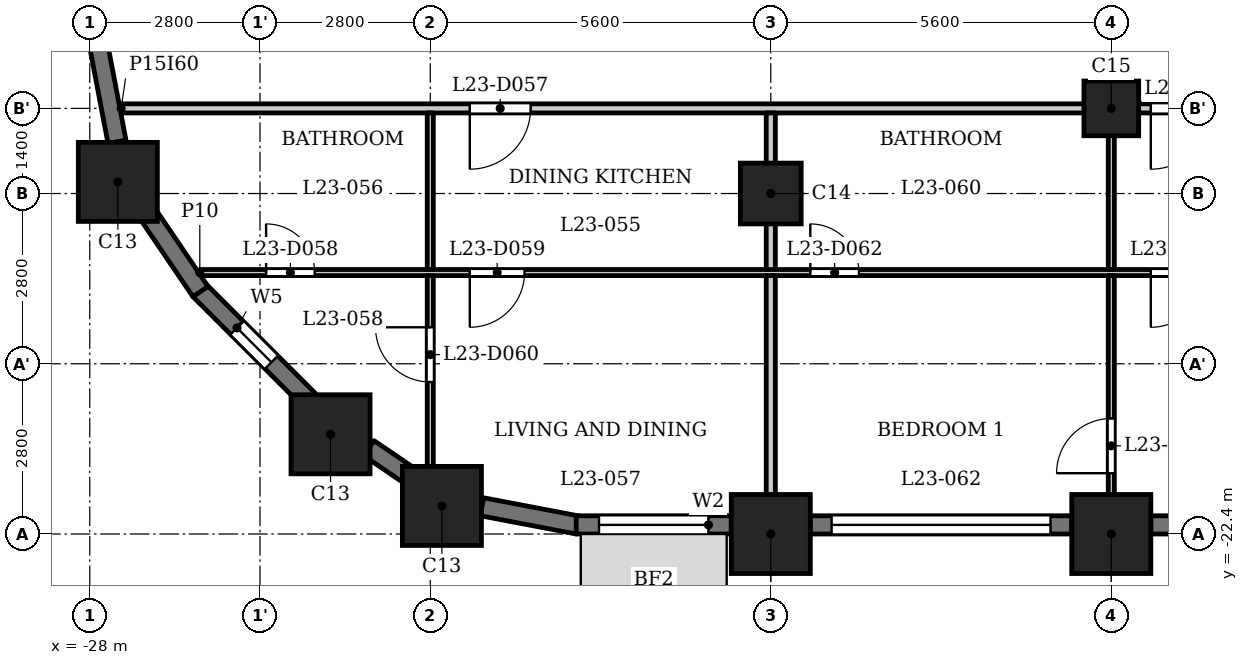
"""IFC4 building model, lengths in metres.
Left out: names, types, materials, properties, quantities, classifications, styles, units other than length and angle.
Written with IfcOpenShell. Run it as: python <this file> out.ifc"""

import sys

from ifc_helpers import new_model, si_unit, direction, frame, frame_2d, origin, origin_2d, place, context, subcontext, project, spatial, rectangle, extrude, element, fill, save


model = new_model("IFC4")
c1 = context("Model", 3, precision=1e-05, world=origin(), true_north=direction((0.0, 1.0)))
c2 = subcontext(c1, "Body", "Model", "MODEL_VIEW")
j1 = project(units=[si_unit("LENGTHUNIT", "METRE"), si_unit("PLANEANGLEUNIT", "RADIAN")], contexts=[c1])
p1 = place(None, origin())
s1 = spatial("IfcSite", under=j1, at=p1, CompositionType="ELEMENT")
p2 = place(p1, origin())
s2 = spatial("IfcBuilding", under=s1, at=p2, CompositionType="ELEMENT")
p3 = place(p2, frame((0.0, 0.0, 93.8)))
s3 = spatial("IfcBuildingStorey", under=s2, at=p3, CompositionType="ELEMENT", Elevation=93.8)
for number, where, z_axis, x_axis in (
    (1, (-22.209, -21.938, 0.0), (0.0, 0.0, 1.0), (1.0, 0.0, 0.0)),
    (2, (-16.8, -22.4, 0.0), (0.0, 0.0, 1.0), (1.0, 0.0, 0.0)),
    (3, (-11.2, -22.4, 0.0), (0.0, 0.0, 1.0), (1.0, 0.0, 0.0)),
    (4, (-27.538, -16.609, 0.0), (0.0, 0.0, 1.0), (1.0, 0.0, 0.0)),
    (5, (-24.04, -20.76, 0.0), (0.0, 0.0, 1.0), (1.0, 0.0, 0.0)),
):
    element("IfcColumn", number, at=place(p3, frame(where, z_axis=z_axis, x_axis=x_axis)), inside=s3, PredefinedType="COLUMN", context=c2, shape_type="SweptSolid", body=[
        extrude(rectangle(XDim=1.3, YDim=1.3, at=origin_2d()), origin(), (0.0, 0.0, 1.0), 3.5),
    ])
p4 = place(p3, frame((-16.8, -16.8, 0.0), z_axis=(0.0, 0.0, 1.0), x_axis=(1.0, 0.0, 0.0)))
e6 = element("IfcColumn", 6, at=p4, inside=s3, PredefinedType="COLUMN", context=c2, shape_type="SweptSolid", body=[
    extrude(rectangle(XDim=1.0, YDim=1.0, at=origin_2d()), origin(), (0.0, 0.0, 1.0), 3.5),
])
p5 = place(p3, frame((-11.2, -15.4, 0.0), z_axis=(0.0, 0.0, 1.0), x_axis=(1.0, 0.0, 0.0)))
e7 = element("IfcColumn", 7, at=p5, inside=s3, PredefinedType="COLUMN", context=c2, shape_type="SweptSolid", body=[
    extrude(rectangle(XDim=0.9, YDim=0.9, at=origin_2d()), origin(), (0.0, 0.0, 1.0), 3.5),
])
p6 = place(p3, frame((-26.197, -18.391, 0.0), z_axis=(0.0, 0.0, 1.0), x_axis=(0.707058908279, -0.707154650853, 0.0)))
e8 = element("IfcWall", 8, at=p6, inside=s3, PredefinedType="SOLIDWALL", context=c2, shape_type="SweptSolid", body=[
    extrude(rectangle(XDim=2.55, YDim=0.3, at=frame_2d((1.275, 0.0))), origin(), (0.0, 0.0, 1.0), 2.4),
])
p7 = place(p6, frame((0.875, 0.0, 0.6)))
e9 = element("IfcOpeningElement", 9, at=p7, cuts=e8, PredefinedType="OPENING", context=c2, shape_type="SweptSolid", body=[
    extrude(rectangle(XDim=0.8, YDim=1.55, at=frame_2d((0.4, 0.775))), frame((0.0, 0.16, 0.0), z_axis=(0.0, -1.0, 0.0), x_axis=(1.0, 0.0, 0.0)), (0.0, 0.0, 1.0), 0.32),
])
p8 = place(p3, frame((-23.41, -20.989, 0.0), z_axis=(0.0, 0.0, 1.0), x_axis=(0.827050703543, -0.562127328787, 0.0)))
e10 = element("IfcWall", 10, at=p8, inside=s3, PredefinedType="SOLIDWALL", context=c2, shape_type="SweptSolid", body=[
    extrude(rectangle(XDim=0.877, YDim=0.3, at=frame_2d((0.438, 0.0))), origin(), (0.0, 0.0, 1.0), 3.2),
])
p9 = place(p3, frame((-21.55, -21.952, 0.0), z_axis=(0.0, 0.0, 1.0), x_axis=(0.982278644094, -0.187426426519, 0.0)))
e11 = element("IfcWall", 11, at=p9, inside=s3, PredefinedType="SOLIDWALL", context=c2, shape_type="SweptSolid", body=[
    extrude(rectangle(XDim=1.606, YDim=0.3, at=frame_2d((0.803, 0.0))), origin(), (0.0, 0.0, 1.0), 2.4),
])
p10 = place(p3, frame((-20.0, -22.25, 0.0), z_axis=(0.0, 0.0, 1.0), x_axis=(1.0, 0.0, 0.0)))
e12 = element("IfcWall", 12, at=p10, inside=s3, PredefinedType="SOLIDWALL", context=c2, shape_type="SweptSolid", body=[
    extrude(rectangle(XDim=2.55, YDim=0.3, at=frame_2d((1.275, 0.0))), origin(), (0.0, 0.0, 1.0), 2.4),
])
p11 = place(p10, frame((0.375, 0.0, 0.9)))
e13 = element("IfcOpeningElement", 13, at=p11, cuts=e12, PredefinedType="OPENING", context=c2, shape_type="SweptSolid", body=[
    extrude(rectangle(XDim=1.8, YDim=1.25, at=frame_2d((0.9, 0.625))), frame((0.0, 0.16, 0.0), z_axis=(0.0, -1.0, 0.0), x_axis=(1.0, 0.0, 0.0)), (0.0, 0.0, 1.0), 0.32),
])
p12 = place(p3, frame((-16.15, -22.25, 0.0), z_axis=(0.0, 0.0, 1.0), x_axis=(1.0, 0.0, 0.0)))
e14 = element("IfcWall", 14, at=p12, inside=s3, PredefinedType="SOLIDWALL", context=c2, shape_type="SweptSolid", body=[
    extrude(rectangle(XDim=4.3, YDim=0.3, at=frame_2d((2.15, 0.0))), origin(), (0.0, 0.0, 1.0), 2.4),
])
p13 = place(p12, frame((0.35, 0.0, 1.2)))
e15 = element("IfcOpeningElement", 15, at=p13, cuts=e14, PredefinedType="OPENING", context=c2, shape_type="SweptSolid", body=[
    extrude(rectangle(XDim=3.6, YDim=0.95, at=frame_2d((1.8, 0.475))), frame((0.0, 0.16, 0.0), z_axis=(0.0, -1.0, 0.0), x_axis=(1.0, 0.0, 0.0)), (0.0, 0.0, 1.0), 0.32),
])
p14 = place(p3, frame((-10.55, -22.25, 0.0), z_axis=(0.0, 0.0, 1.0), x_axis=(1.0, 0.0, 0.0)))
e16 = element("IfcWall", 16, at=p14, inside=s3, PredefinedType="SOLIDWALL", context=c2, shape_type="SweptSolid", body=[
    extrude(rectangle(XDim=4.3, YDim=0.3, at=frame_2d((2.15, 0.0))), origin(), (0.0, 0.0, 1.0), 2.4),
])
p15 = place(p14, frame((0.35, 0.0, 1.2)))
e17 = element("IfcOpeningElement", 17, at=p15, cuts=e16, PredefinedType="OPENING", context=c2, shape_type="SweptSolid", body=[
    extrude(rectangle(XDim=3.6, YDim=0.95, at=frame_2d((1.8, 0.475))), frame((0.0, 0.16, 0.0), z_axis=(0.0, -1.0, 0.0), x_axis=(1.0, 0.0, 0.0)), (0.0, 0.0, 1.0), 0.32),
])
for number, where, z_axis, x_axis in (
    (18, (-27.853, -14.372, 0.0), (0.0, 0.0, 1.0), (0.187, -0.982, 0.0)),
    (19, (-27.082, -17.084, 0.0), (0.0, 0.0, 1.0), (0.562, -0.827, 0.0)),
):
    element("IfcWall", number, at=place(p3, frame(where, z_axis=z_axis, x_axis=x_axis)), inside=s3, PredefinedType="SOLIDWALL", context=c2, shape_type="SweptSolid", body=[
        extrude(rectangle(XDim=1.606, YDim=0.3, at=frame_2d((0.803, 0.0))), origin(), (0.0, 0.0, 1.0), 2.4),
    ])
p16 = place(p3, frame((-26.19, -18.1, 0.0), z_axis=(0.0, 0.0, 1.0), x_axis=(1.0, 0.0, 0.0)))
e20 = element("IfcWall", 20, at=p16, inside=s3, PredefinedType="PARTITIONING", context=c2, shape_type="SweptSolid", body=[
    extrude(rectangle(XDim=52.63, YDim=0.1, at=frame_2d((26.315, 0.0))), origin(), (0.0, 0.0, 1.0), 3.2),
])
p17 = place(p16, frame((1.09, 0.0, 0.0)))
e21 = element("IfcOpeningElement", 21, at=p17, cuts=e20, PredefinedType="OPENING", context=c2, shape_type="SweptSolid", body=[
    extrude(rectangle(XDim=0.8, YDim=2.1, at=frame_2d((0.4, 1.05))), frame((0.0, 0.06, 0.0), z_axis=(0.0, -1.0, 0.0), x_axis=(1.0, 0.0, 0.0)), (0.0, 0.0, 1.0), 0.12),
])
p18 = place(p16, frame((4.44, 0.0, 0.0)))
e22 = element("IfcOpeningElement", 22, at=p18, cuts=e20, PredefinedType="OPENING", context=c2, shape_type="SweptSolid", body=[
    extrude(rectangle(XDim=0.9, YDim=2.1, at=frame_2d((0.45, 1.05))), frame((0.0, 0.06, 0.0), z_axis=(0.0, -1.0, 0.0), x_axis=(1.0, 0.0, 0.0)), (0.0, 0.0, 1.0), 0.12),
])
p19 = place(p16, frame((10.04, 0.0, 0.0)))
e23 = element("IfcOpeningElement", 23, at=p19, cuts=e20, PredefinedType="OPENING", context=c2, shape_type="SweptSolid", body=[
    extrude(rectangle(XDim=0.8, YDim=2.1, at=frame_2d((0.4, 1.05))), frame((0.0, 0.06, 0.0), z_axis=(0.0, -1.0, 0.0), x_axis=(1.0, 0.0, 0.0)), (0.0, 0.0, 1.0), 0.12),
])
p20 = place(p16, frame((15.64, 0.0, 0.0)))
e24 = element("IfcOpeningElement", 24, at=p20, cuts=e20, PredefinedType="OPENING", context=c2, shape_type="SweptSolid", body=[
    extrude(rectangle(XDim=0.9, YDim=2.1, at=frame_2d((0.45, 1.05))), frame((0.0, 0.06, 0.0), z_axis=(0.0, -1.0, 0.0), x_axis=(1.0, 0.0, 0.0)), (0.0, 0.0, 1.0), 0.12),
])
p21 = place(p16, frame((24.74, 0.0, 0.0)))
e25 = element("IfcOpeningElement", 25, at=p21, cuts=e20, PredefinedType="OPENING", context=c2, shape_type="SweptSolid", body=[
    extrude(rectangle(XDim=0.8, YDim=2.1, at=frame_2d((0.4, 1.05))), frame((0.0, 0.06, 0.0), z_axis=(0.0, -1.0, 0.0), x_axis=(1.0, 0.0, 0.0)), (0.0, 0.0, 1.0), 0.12),
])
p22 = place(p16, frame((21.24, 0.0, 0.0)))
e26 = element("IfcOpeningElement", 26, at=p22, cuts=e20, PredefinedType="OPENING", context=c2, shape_type="SweptSolid", body=[
    extrude(rectangle(XDim=0.9, YDim=2.1, at=frame_2d((0.45, 1.05))), frame((0.0, 0.06, 0.0), z_axis=(0.0, -1.0, 0.0), x_axis=(1.0, 0.0, 0.0)), (0.0, 0.0, 1.0), 0.12),
])
p23 = place(p16, frame((35.94, 0.0, 0.0)))
e27 = element("IfcOpeningElement", 27, at=p23, cuts=e20, PredefinedType="OPENING", context=c2, shape_type="SweptSolid", body=[
    extrude(rectangle(XDim=0.8, YDim=2.1, at=frame_2d((0.4, 1.05))), frame((0.0, 0.06, 0.0), z_axis=(0.0, -1.0, 0.0), x_axis=(1.0, 0.0, 0.0)), (0.0, 0.0, 1.0), 0.12),
])
p24 = place(p16, frame((33.19, 0.0, 0.0)))
e28 = element("IfcOpeningElement", 28, at=p24, cuts=e20, PredefinedType="OPENING", context=c2, shape_type="SweptSolid", body=[
    extrude(rectangle(XDim=0.9, YDim=2.1, at=frame_2d((0.45, 1.05))), frame((0.0, 0.06, 0.0), z_axis=(0.0, -1.0, 0.0), x_axis=(1.0, 0.0, 0.0)), (0.0, 0.0, 1.0), 0.12),
])
p25 = place(p16, frame((27.59, 0.0, 0.0)))
e29 = element("IfcOpeningElement", 29, at=p25, cuts=e20, PredefinedType="OPENING", context=c2, shape_type="SweptSolid", body=[
    extrude(rectangle(XDim=0.9, YDim=2.1, at=frame_2d((0.45, 1.05))), frame((0.0, 0.06, 0.0), z_axis=(0.0, -1.0, 0.0), x_axis=(1.0, 0.0, 0.0)), (0.0, 0.0, 1.0), 0.12),
])
p26 = place(p16, frame((29.64, 0.0, 0.0)))
e30 = element("IfcOpeningElement", 30, at=p26, cuts=e20, PredefinedType="OPENING", context=c2, shape_type="SweptSolid", body=[
    extrude(rectangle(XDim=0.9, YDim=2.1, at=frame_2d((0.45, 1.05))), frame((0.0, 0.06, 0.0), z_axis=(0.0, -1.0, 0.0), x_axis=(1.0, 0.0, 0.0)), (0.0, 0.0, 1.0), 0.12),
])
p27 = place(p16, frame((41.54, 0.0, 0.0)))
e31 = element("IfcOpeningElement", 31, at=p27, cuts=e20, PredefinedType="OPENING", context=c2, shape_type="SweptSolid", body=[
    extrude(rectangle(XDim=0.8, YDim=2.1, at=frame_2d((0.4, 1.05))), frame((0.0, 0.06, 0.0), z_axis=(0.0, -1.0, 0.0), x_axis=(1.0, 0.0, 0.0)), (0.0, 0.0, 1.0), 0.12),
])
p28 = place(p16, frame((38.54, 0.0, 0.0)))
e32 = element("IfcOpeningElement", 32, at=p28, cuts=e20, PredefinedType="OPENING", context=c2, shape_type="SweptSolid", body=[
    extrude(rectangle(XDim=0.9, YDim=2.1, at=frame_2d((0.45, 1.05))), frame((0.0, 0.06, 0.0), z_axis=(0.0, -1.0, 0.0), x_axis=(1.0, 0.0, 0.0)), (0.0, 0.0, 1.0), 0.12),
])
p29 = place(p16, frame((49.204, 0.0, 0.0)))
e33 = element("IfcOpeningElement", 33, at=p29, cuts=e20, PredefinedType="OPENING", context=c2, shape_type="SweptSolid", body=[
    extrude(rectangle(XDim=0.8, YDim=2.1, at=frame_2d((0.4, 1.05))), frame((0.0, 0.06, 0.0), z_axis=(0.0, -1.0, 0.0), x_axis=(1.0, 0.0, 0.0)), (0.0, 0.0, 1.0), 0.12),
])
p30 = place(p16, frame((43.64, 0.0, 0.0)))
e34 = element("IfcOpeningElement", 34, at=p30, cuts=e20, PredefinedType="OPENING", context=c2, shape_type="SweptSolid", body=[
    extrude(rectangle(XDim=0.9, YDim=2.1, at=frame_2d((0.45, 1.05))), frame((0.0, 0.06, 0.0), z_axis=(0.0, -1.0, 0.0), x_axis=(1.0, 0.0, 0.0)), (0.0, 0.0, 1.0), 0.12),
])
p31 = place(p3, frame((-27.484, -15.4, 0.0), z_axis=(0.0, 0.0, 1.0), x_axis=(1.0, 0.0, 0.0)))
e35 = element("IfcWall", 35, at=p31, inside=s3, PredefinedType="PARTITIONING", context=c2, shape_type="SweptSolid", body=[
    extrude(rectangle(XDim=54.968, YDim=0.15, at=frame_2d((27.484, 0.0))), origin(), (0.0, 0.0, 1.0), 3.2),
])
p32 = place(p31, frame((5.734, 0.0, 0.0)))
e36 = element("IfcOpeningElement", 36, at=p32, cuts=e35, PredefinedType="OPENING", context=c2, shape_type="SweptSolid", body=[
    extrude(rectangle(XDim=1.0, YDim=2.1, at=frame_2d((0.5, 1.05))), frame((0.0, 0.085, 0.0), z_axis=(0.0, -1.0, 0.0), x_axis=(1.0, 0.0, 0.0)), (0.0, 0.0, 1.0), 0.17),
])
p33 = place(p31, frame((16.934, 0.0, 0.0)))
e37 = element("IfcOpeningElement", 37, at=p33, cuts=e35, PredefinedType="OPENING", context=c2, shape_type="SweptSolid", body=[
    extrude(rectangle(XDim=1.0, YDim=2.1, at=frame_2d((0.5, 1.05))), frame((0.0, 0.085, 0.0), z_axis=(0.0, -1.0, 0.0), x_axis=(1.0, 0.0, 0.0)), (0.0, 0.0, 1.0), 0.17),
])
p34 = place(p31, frame((22.534, 0.0, 0.0)))
e38 = element("IfcOpeningElement", 38, at=p34, cuts=e35, PredefinedType="OPENING", context=c2, shape_type="SweptSolid", body=[
    extrude(rectangle(XDim=1.0, YDim=2.1, at=frame_2d((0.5, 1.05))), frame((0.0, 0.085, 0.0), z_axis=(0.0, -1.0, 0.0), x_axis=(1.0, 0.0, 0.0)), (0.0, 0.0, 1.0), 0.17),
])
p35 = place(p31, frame((31.384, 0.0, 0.0)))
e39 = element("IfcOpeningElement", 39, at=p35, cuts=e35, PredefinedType="OPENING", context=c2, shape_type="SweptSolid", body=[
    extrude(rectangle(XDim=1.0, YDim=2.1, at=frame_2d((0.5, 1.05))), frame((0.0, 0.085, 0.0), z_axis=(0.0, -1.0, 0.0), x_axis=(1.0, 0.0, 0.0)), (0.0, 0.0, 1.0), 0.17),
])
p36 = place(p31, frame((39.584, 0.0, 0.0)))
e40 = element("IfcOpeningElement", 40, at=p36, cuts=e35, PredefinedType="OPENING", context=c2, shape_type="SweptSolid", body=[
    extrude(rectangle(XDim=1.0, YDim=2.1, at=frame_2d((0.5, 1.05))), frame((0.0, 0.085, 0.0), z_axis=(0.0, -1.0, 0.0), x_axis=(1.0, 0.0, 0.0)), (0.0, 0.0, 1.0), 0.17),
])
p37 = place(p31, frame((44.934, 0.0, 0.0)))
e41 = element("IfcOpeningElement", 41, at=p37, cuts=e35, PredefinedType="OPENING", context=c2, shape_type="SweptSolid", body=[
    extrude(rectangle(XDim=1.0, YDim=2.1, at=frame_2d((0.5, 1.05))), frame((0.0, 0.085, 0.0), z_axis=(0.0, -1.0, 0.0), x_axis=(1.0, 0.0, 0.0)), (0.0, 0.0, 1.0), 0.17),
])
p38 = place(p3, frame((-22.4, -21.72, 0.0), z_axis=(0.0, 0.0, 1.0), x_axis=(0.0, 1.0, 0.0)))
e42 = element("IfcWall", 42, at=p38, inside=s3, PredefinedType="PARTITIONING", context=c2, shape_type="SweptSolid", body=[
    extrude(rectangle(XDim=3.57, YDim=0.1, at=frame_2d((1.785, 0.0))), origin(), (0.0, 0.0, 1.0), 3.2),
])
p39 = place(p38, frame((1.82, 0.0, 0.0)))
e43 = element("IfcOpeningElement", 43, at=p39, cuts=e42, PredefinedType="OPENING", context=c2, shape_type="SweptSolid", body=[
    extrude(rectangle(XDim=0.9, YDim=2.1, at=frame_2d((0.45, 1.05))), frame((0.0, 0.06, 0.0), z_axis=(0.0, -1.0, 0.0), x_axis=(1.0, 0.0, 0.0)), (0.0, 0.0, 1.0), 0.12),
])
p40 = place(p3, frame((-22.4, -18.05, 0.0), z_axis=(0.0, 0.0, 1.0), x_axis=(0.0, 1.0, 0.0)))
e44 = element("IfcWall", 44, at=p40, inside=s3, PredefinedType="PARTITIONING", context=c2, shape_type="SweptSolid", body=[
    extrude(rectangle(XDim=2.575, YDim=0.1, at=frame_2d((1.288, 0.0))), origin(), (0.0, 0.0, 1.0), 3.2),
])
p41 = place(p3, frame((-16.8, -23.03, 0.0), z_axis=(0.0, 0.0, 1.0), x_axis=(0.0, 1.0, 0.0)))
e45 = element("IfcWall", 45, at=p41, inside=s3, PredefinedType="PARTITIONING", context=c2, shape_type="SweptSolid", body=[
    extrude(rectangle(XDim=4.88, YDim=0.15, at=frame_2d((2.44, 0.0))), origin(), (0.0, 0.0, 1.0), 3.2),
])
p42 = place(p3, frame((-16.8, -18.05, 0.0), z_axis=(0.0, 0.0, 1.0), x_axis=(0.0, 1.0, 0.0)))
e46 = element("IfcWall", 46, at=p42, inside=s3, PredefinedType="PARTITIONING", context=c2, shape_type="SweptSolid", body=[
    extrude(rectangle(XDim=2.575, YDim=0.15, at=frame_2d((1.288, 0.0))), origin(), (0.0, 0.0, 1.0), 3.2),
])
p43 = place(p3, frame((-11.2, -23.03, 0.0), z_axis=(0.0, 0.0, 1.0), x_axis=(0.0, 1.0, 0.0)))
e47 = element("IfcWall", 47, at=p43, inside=s3, PredefinedType="PARTITIONING", context=c2, shape_type="SweptSolid", body=[
    extrude(rectangle(XDim=4.88, YDim=0.1, at=frame_2d((2.44, 0.0))), origin(), (0.0, 0.0, 1.0), 3.2),
])
p44 = place(p43, frame((1.63, 0.0, 0.0)))
e48 = element("IfcOpeningElement", 48, at=p44, cuts=e47, PredefinedType="OPENING", context=c2, shape_type="SweptSolid", body=[
    extrude(rectangle(XDim=0.9, YDim=2.1, at=frame_2d((0.45, 1.05))), frame((0.0, 0.06, 0.0), z_axis=(0.0, -1.0, 0.0), x_axis=(1.0, 0.0, 0.0)), (0.0, 0.0, 1.0), 0.12),
])
p45 = place(p3, frame((-11.2, -18.05, 0.0), z_axis=(0.0, 0.0, 1.0), x_axis=(0.0, 1.0, 0.0)))
e49 = element("IfcWall", 49, at=p45, inside=s3, PredefinedType="PARTITIONING", context=c2, shape_type="SweptSolid", body=[
    extrude(rectangle(XDim=2.575, YDim=0.1, at=frame_2d((1.288, 0.0))), origin(), (0.0, 0.0, 1.0), 3.2),
])
p46 = place(p32, origin())
e50 = element("IfcDoor", 50, at=p46, inside=s3, OperationType="SINGLE_SWING_LEFT", PredefinedType="DOOR", context=c2, shape_type="SweptSolid", body=[
    extrude(rectangle(XDim=1.0, YDim=2.1, at=frame_2d((0.5, 1.05))), frame((0.0, 0.025, 0.0), z_axis=(0.0, -1.0, 0.0), x_axis=(1.0, 0.0, 0.0)), (0.0, 0.0, 1.0), 0.05),
])
fill(e36, e50)
p47 = place(p17, origin())
e51 = element("IfcDoor", 51, at=p47, inside=s3, OperationType="SINGLE_SWING_RIGHT", PredefinedType="DOOR", context=c2, shape_type="SweptSolid", body=[
    extrude(rectangle(XDim=0.8, YDim=2.1, at=frame_2d((0.4, 1.05))), frame((0.0, 0.025, 0.0), z_axis=(0.0, -1.0, 0.0), x_axis=(1.0, 0.0, 0.0)), (0.0, 0.0, 1.0), 0.05),
])
fill(e21, e51)
p48 = place(p18, origin())
e52 = element("IfcDoor", 52, at=p48, inside=s3, OperationType="SINGLE_SWING_LEFT", PredefinedType="DOOR", context=c2, shape_type="SweptSolid", body=[
    extrude(rectangle(XDim=0.9, YDim=2.1, at=frame_2d((0.45, 1.05))), frame((0.0, 0.025, 0.0), z_axis=(0.0, -1.0, 0.0), x_axis=(1.0, 0.0, 0.0)), (0.0, 0.0, 1.0), 0.05),
])
fill(e22, e52)
p49 = place(p39, origin())
e53 = element("IfcDoor", 53, at=p49, inside=s3, OperationType="SINGLE_SWING_LEFT", PredefinedType="DOOR", context=c2, shape_type="SweptSolid", body=[
    extrude(rectangle(XDim=0.9, YDim=2.1, at=frame_2d((0.45, 1.05))), frame((0.0, 0.025, 0.0), z_axis=(0.0, -1.0, 0.0), x_axis=(1.0, 0.0, 0.0)), (0.0, 0.0, 1.0), 0.05),
])
fill(e43, e53)
p50 = place(p33, origin())
e54 = element("IfcDoor", 54, at=p50, inside=s3, OperationType="SINGLE_SWING_LEFT", PredefinedType="DOOR", context=c2, shape_type="SweptSolid", body=[
    extrude(rectangle(XDim=1.0, YDim=2.1, at=frame_2d((0.5, 1.05))), frame((0.0, 0.025, 0.0), z_axis=(0.0, -1.0, 0.0), x_axis=(1.0, 0.0, 0.0)), (0.0, 0.0, 1.0), 0.05),
])
fill(e37, e54)
p51 = place(p19, origin())
e55 = element("IfcDoor", 55, at=p51, inside=s3, OperationType="SINGLE_SWING_RIGHT", PredefinedType="DOOR", context=c2, shape_type="SweptSolid", body=[
    extrude(rectangle(XDim=0.8, YDim=2.1, at=frame_2d((0.4, 1.05))), frame((0.0, 0.025, 0.0), z_axis=(0.0, -1.0, 0.0), x_axis=(1.0, 0.0, 0.0)), (0.0, 0.0, 1.0), 0.05),
])
fill(e23, e55)
p52 = place(p20, origin())
e56 = element("IfcDoor", 56, at=p52, inside=s3, OperationType="SINGLE_SWING_LEFT", PredefinedType="DOOR", context=c2, shape_type="SweptSolid", body=[
    extrude(rectangle(XDim=0.9, YDim=2.1, at=frame_2d((0.45, 1.05))), frame((0.0, 0.025, 0.0), z_axis=(0.0, -1.0, 0.0), x_axis=(1.0, 0.0, 0.0)), (0.0, 0.0, 1.0), 0.05),
])
fill(e24, e56)
p53 = place(p44, origin())
e57 = element("IfcDoor", 57, at=p53, inside=s3, OperationType="SINGLE_SWING_RIGHT", PredefinedType="DOOR", context=c2, shape_type="SweptSolid", body=[
    extrude(rectangle(XDim=0.9, YDim=2.1, at=frame_2d((0.45, 1.05))), frame((0.0, 0.025, 0.0), z_axis=(0.0, -1.0, 0.0), x_axis=(1.0, 0.0, 0.0)), (0.0, 0.0, 1.0), 0.05),
])
fill(e48, e57)
p54 = place(p7, origin())
e58 = element("IfcWindow", 58, at=p54, inside=s3, PartitioningType="SINGLE_PANEL", PredefinedType="WINDOW", context=c2, shape_type="SweptSolid", body=[
    extrude(rectangle(XDim=0.8, YDim=1.55, at=frame_2d((0.4, 0.775))), frame((0.0, 0.03, 0.0), z_axis=(0.0, -1.0, 0.0), x_axis=(1.0, 0.0, 0.0)), (0.0, 0.0, 1.0), 0.06),
])
fill(e9, e58)
p55 = place(p11, origin())
e59 = element("IfcWindow", 59, at=p55, inside=s3, PartitioningType="SINGLE_PANEL", PredefinedType="WINDOW", context=c2, shape_type="SweptSolid", body=[
    extrude(rectangle(XDim=1.8, YDim=1.25, at=frame_2d((0.9, 0.625))), frame((0.0, 0.03, 0.0), z_axis=(0.0, -1.0, 0.0), x_axis=(1.0, 0.0, 0.0)), (0.0, 0.0, 1.0), 0.06),
])
fill(e13, e59)
p56 = place(p13, origin())
e60 = element("IfcWindow", 60, at=p56, inside=s3, PartitioningType="SINGLE_PANEL", PredefinedType="WINDOW", context=c2, shape_type="SweptSolid", body=[
    extrude(rectangle(XDim=3.6, YDim=0.95, at=frame_2d((1.8, 0.475))), frame((0.0, 0.03, 0.0), z_axis=(0.0, -1.0, 0.0), x_axis=(1.0, 0.0, 0.0)), (0.0, 0.0, 1.0), 0.06),
])
fill(e15, e60)
save(model, sys.argv[1])
